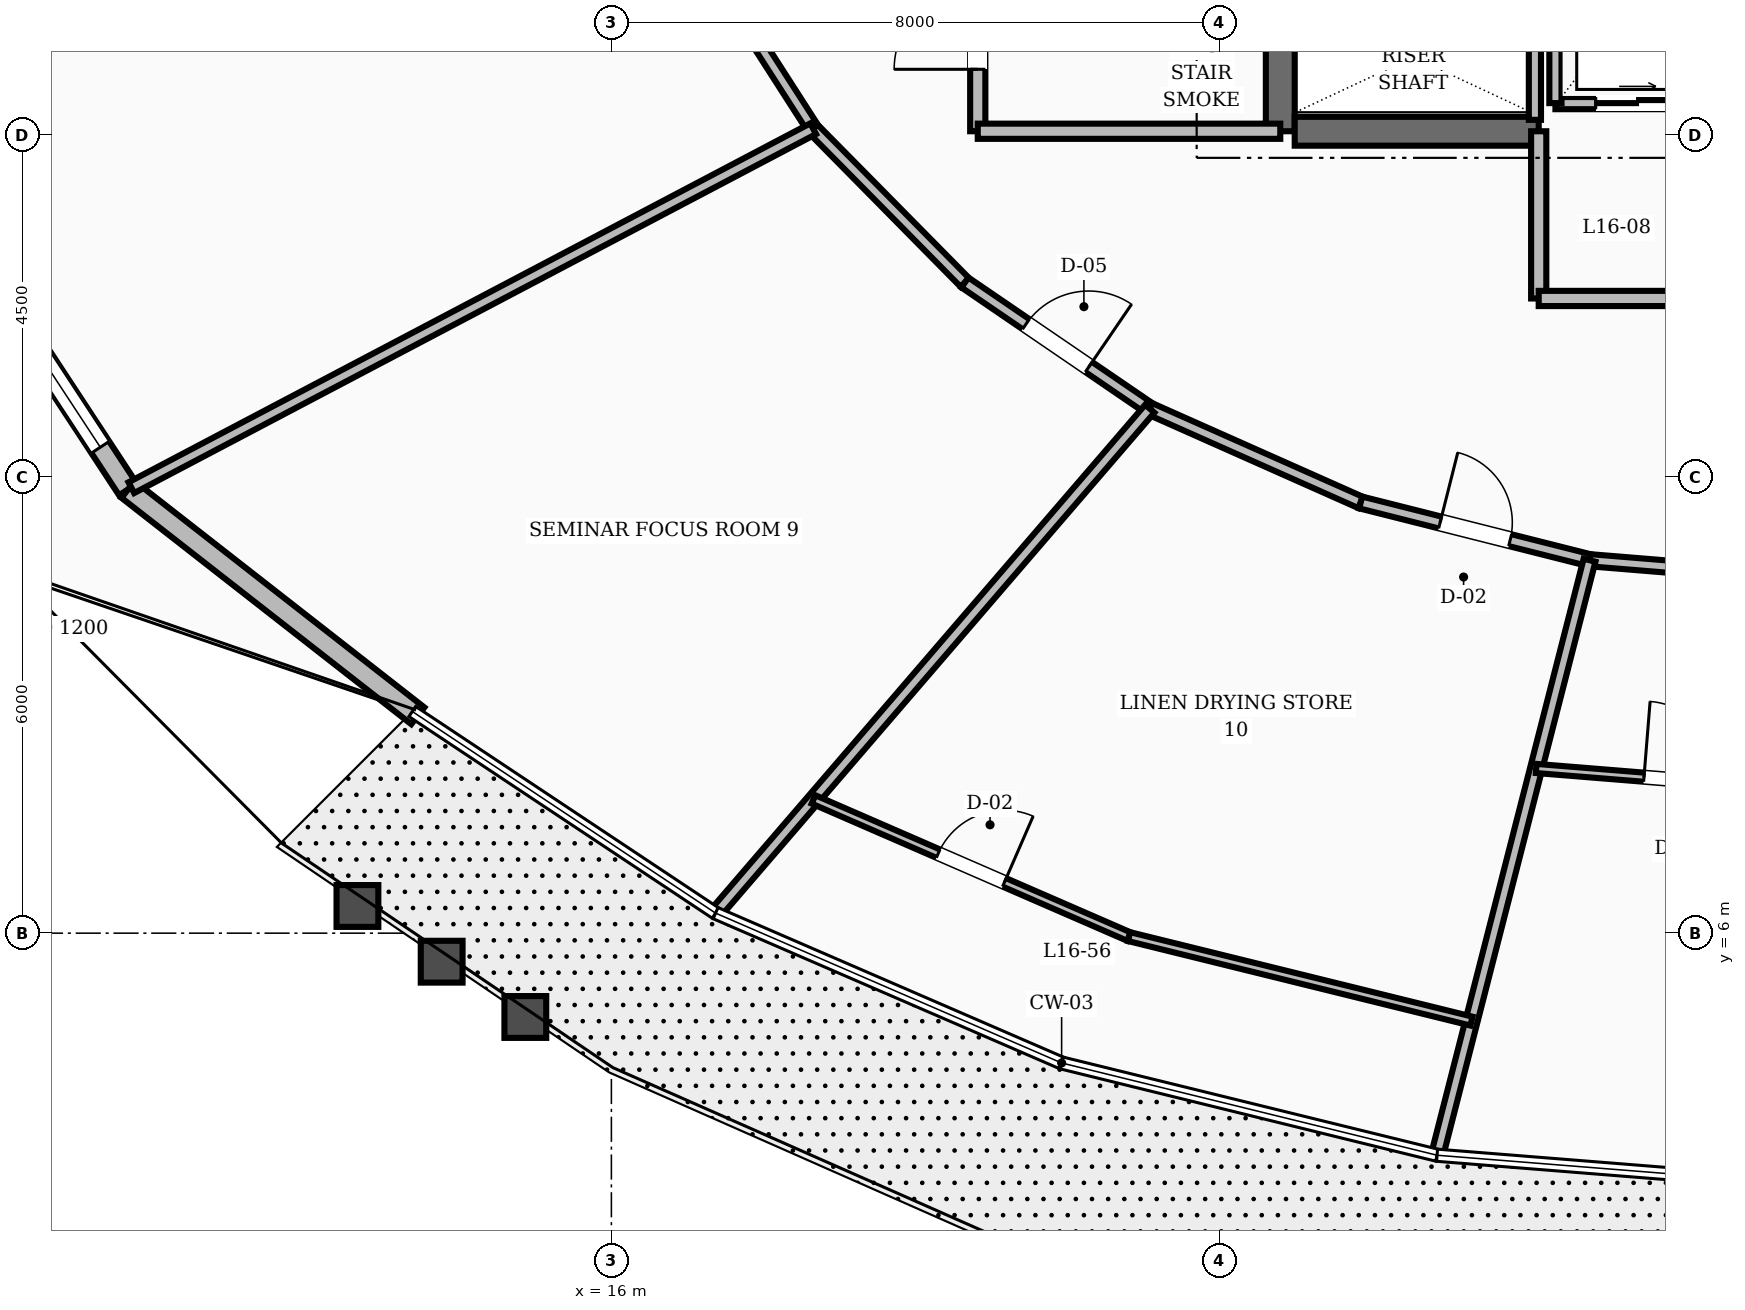
"""IFC4 building model, lengths in metres.
Left out: names, types, materials, properties, quantities, classifications, styles, units other than length and angle.
Written with IfcOpenShell. Run it as: python <this file> out.ifc"""

import sys

from ifc_helpers import new_model, si_unit, direction, frame, frame_2d, origin, place, context, subcontext, project, spatial, rectangle, extrude, element, fill, save


model = new_model("IFC4")
c1 = context("Model", 3, precision=1e-05, world=origin(), true_north=direction((0.0, 1.0)))
c2 = subcontext(c1, "Body", "Model", "MODEL_VIEW")
j1 = project(units=[si_unit("LENGTHUNIT", "METRE"), si_unit("PLANEANGLEUNIT", "RADIAN")], contexts=[c1])
p1 = place(None, origin())
s1 = spatial("IfcSite", under=j1, at=p1, CompositionType="ELEMENT")
p2 = place(p1, origin())
s2 = spatial("IfcBuilding", under=s1, at=p2, CompositionType="ELEMENT")
p3 = place(p2, frame((0.0, 0.0, 66.4)))
s3 = spatial("IfcBuildingStorey", under=s2, at=p3, CompositionType="ELEMENT", Elevation=66.4)
p4 = place(p3, frame((24.8, 16.55, 0.0), z_axis=(0.0, 0.0, 1.0), x_axis=(0.0, 1.0, 0.0)))
e1 = element("IfcWall", 1, at=p4, inside=s3, PredefinedType="SHEAR", context=c2, shape_type="SweptSolid", body=[
    extrude(rectangle(XDim=6.3, YDim=0.38, at=frame_2d((3.15, 0.0))), origin(), (0.0, 0.0, 1.0), 3.6),
])
p5 = place(p3, frame((24.99, 16.55, 0.0), z_axis=(0.0, 0.0, 1.0), x_axis=(1.0, 0.0, 0.0)))
e2 = element("IfcWall", 2, at=p5, inside=s3, PredefinedType="SHEAR", context=c2, shape_type="SweptSolid", body=[
    extrude(rectangle(XDim=3.21, YDim=0.38, at=frame_2d((1.605, 0.0))), origin(), (0.0, 0.0, 1.0), 3.6),
])
p6 = place(p3, frame((7.156, 15.623, 0.0), z_axis=(0.0, 0.0, 1.0), x_axis=(0.54881308027, -0.83594509564, 0.0)))
e3 = element("IfcWall", 3, at=p6, inside=s3, PredefinedType="STANDARD", context=c2, shape_type="SweptSolid", body=[
    extrude(rectangle(XDim=4.528, YDim=0.28, at=frame_2d((2.264, 0.0))), origin(), (0.0, 0.0, 1.0), 2.71),
])
p7 = place(p6, frame((0.664, 0.0, 0.8)))
e4 = element("IfcOpeningElement", 4, at=p7, cuts=e3, PredefinedType="OPENING", context=c2, shape_type="SweptSolid", body=[
    extrude(rectangle(XDim=3.2, YDim=1.65, at=frame_2d((1.6, 0.825))), frame((0.0, 0.15, 0.0), z_axis=(0.0, -1.0, 0.0), x_axis=(1.0, 0.0, 0.0)), (0.0, 0.0, 1.0), 0.3),
])
p8 = place(p3, frame((9.64, 11.838, 0.0), z_axis=(0.0, 0.0, 1.0), x_axis=(0.788136059421, -0.615501057546, 0.0)))
e5 = element("IfcWall", 5, at=p8, inside=s3, PredefinedType="STANDARD", context=c2, shape_type="SweptSolid", body=[
    extrude(rectangle(XDim=4.838, YDim=0.28, at=frame_2d((2.419, 0.0))), origin(), (0.0, 0.0, 1.0), 2.71),
])
p9 = place(p3, frame((20.82, 16.55, 0.0), z_axis=(0.0, 0.0, 1.0), x_axis=(0.0, 1.0, 0.0)))
e6 = element("IfcWall", 6, at=p9, inside=s3, PredefinedType="SOLIDWALL", context=c2, shape_type="SweptSolid", body=[
    extrude(rectangle(XDim=2.73, YDim=0.2, at=frame_2d((1.365, 0.0))), origin(), (0.0, 0.0, 1.0), 2.71),
])
p10 = place(p9, frame((0.815, 0.0, 0.0)))
e7 = element("IfcOpeningElement", 7, at=p10, cuts=e6, PredefinedType="OPENING", context=c2, shape_type="SweptSolid", body=[
    extrude(rectangle(XDim=1.1, YDim=2.1, at=frame_2d((0.55, 1.05))), frame((0.0, 0.11, 0.0), z_axis=(0.0, -1.0, 0.0), x_axis=(1.0, 0.0, 0.0)), (0.0, 0.0, 1.0), 0.22),
])
p11 = place(p3, frame((20.82, 16.55, 0.0), z_axis=(0.0, 0.0, 1.0), x_axis=(1.0, 0.0, 0.0)))
e8 = element("IfcWall", 8, at=p11, inside=s3, PredefinedType="SOLIDWALL", context=c2, shape_type="SweptSolid", body=[
    extrude(rectangle(XDim=3.98, YDim=0.2, at=frame_2d((1.99, 0.0))), origin(), (0.0, 0.0, 1.0), 2.71),
])
p12 = place(p3, frame((28.2, 14.35, 0.0), z_axis=(0.0, 0.0, 1.0), x_axis=(0.0, 1.0, 0.0)))
e9 = element("IfcWall", 9, at=p12, inside=s3, PredefinedType="SOLIDWALL", context=c2, shape_type="SweptSolid", body=[
    extrude(rectangle(XDim=2.2, YDim=0.2, at=frame_2d((1.1, 0.0))), origin(), (0.0, 0.0, 1.0), 2.71),
])
p13 = place(p3, frame((28.2, 14.35, 0.0), z_axis=(0.0, 0.0, 1.0), x_axis=(1.0, 0.0, 0.0)))
e10 = element("IfcWall", 10, at=p13, inside=s3, PredefinedType="SOLIDWALL", context=c2, shape_type="SweptSolid", body=[
    extrude(rectangle(XDim=7.6, YDim=0.2, at=frame_2d((3.8, 0.0))), origin(), (0.0, 0.0, 1.0), 2.71),
])
p14 = place(p13, frame((3.2, 0.0, 0.0)))
e11 = element("IfcOpeningElement", 11, at=p14, cuts=e10, PredefinedType="OPENING", context=c2, shape_type="SweptSolid", body=[
    extrude(rectangle(XDim=1.2, YDim=2.1, at=frame_2d((0.6, 1.05))), frame((0.0, 0.11, 0.0), z_axis=(0.0, -1.0, 0.0), x_axis=(1.0, 0.0, 0.0)), (0.0, 0.0, 1.0), 0.22),
])
p15 = place(p3, frame((28.42, 16.92, 0.0), z_axis=(0.0, 0.0, 1.0), x_axis=(1.0, 0.0, 0.0)))
e12 = element("IfcWall", 12, at=p15, inside=s3, PredefinedType="SOLIDWALL", context=c2, shape_type="SweptSolid", body=[
    extrude(rectangle(XDim=7.16, YDim=0.16, at=frame_2d((3.58, 0.0))), origin(), (0.0, 0.0, 1.0), 2.71),
])
p16 = place(p15, frame((0.53, 0.0, 0.0)))
e13 = element("IfcOpeningElement", 13, at=p16, cuts=e12, PredefinedType="OPENING", context=c2, shape_type="SweptSolid", body=[
    extrude(rectangle(XDim=1.1, YDim=2.15, at=frame_2d((0.55, 1.075))), frame((0.0, 0.09, 0.0), z_axis=(0.0, -1.0, 0.0), x_axis=(1.0, 0.0, 0.0)), (0.0, 0.0, 1.0), 0.18),
])
p17 = place(p15, frame((3.03, 0.0, 0.0)))
e14 = element("IfcOpeningElement", 14, at=p17, cuts=e12, PredefinedType="OPENING", context=c2, shape_type="SweptSolid", body=[
    extrude(rectangle(XDim=1.1, YDim=2.15, at=frame_2d((0.55, 1.075))), frame((0.0, 0.09, 0.0), z_axis=(0.0, -1.0, 0.0), x_axis=(1.0, 0.0, 0.0)), (0.0, 0.0, 1.0), 0.18),
])
p18 = place(p15, frame((5.53, 0.0, 0.0)))
e15 = element("IfcOpeningElement", 15, at=p18, cuts=e12, PredefinedType="OPENING", context=c2, shape_type="SweptSolid", body=[
    extrude(rectangle(XDim=1.1, YDim=2.15, at=frame_2d((0.55, 1.075))), frame((0.0, 0.09, 0.0), z_axis=(0.0, -1.0, 0.0), x_axis=(1.0, 0.0, 0.0)), (0.0, 0.0, 1.0), 0.18),
])
p19 = place(p3, frame((28.42, 16.92, 0.0), z_axis=(0.0, 0.0, 1.0), x_axis=(0.0, 1.0, 0.0)))
e16 = element("IfcWall", 16, at=p19, inside=s3, PredefinedType="SOLIDWALL", context=c2, shape_type="SweptSolid", body=[
    extrude(rectangle(XDim=2.76, YDim=0.16, at=frame_2d((1.38, 0.0))), origin(), (0.0, 0.0, 1.0), 2.71),
])
p20 = place(p3, frame((28.15, 16.7, 0.0), z_axis=(0.0, 0.0, 1.0), x_axis=(0.0, 1.0, 0.0)))
e17 = element("IfcWall", 17, at=p20, inside=s3, PredefinedType="SOLIDWALL", context=c2, shape_type="SweptSolid", body=[
    extrude(rectangle(XDim=6.05, YDim=0.16, at=frame_2d((3.025, 0.0))), origin(), (0.0, 0.0, 1.0), 2.71),
])
p21 = place(p3, frame((17.172, 18.891, 0.0), z_axis=(0.0, 0.0, 1.0), x_axis=(0.540595670038, -0.841282545603, 0.0)))
e18 = element("IfcWall", 18, at=p21, inside=s3, PredefinedType="SOLIDWALL", context=c2, shape_type="SweptSolid", body=[
    extrude(rectangle(XDim=2.744, YDim=0.16, at=frame_2d((1.372, 0.0))), origin(), (0.0, 0.0, 1.0), 2.71),
])
p22 = place(p3, frame((18.655, 16.583, 0.0), z_axis=(0.0, 0.0, 1.0), x_axis=(0.702366174226, -0.711815816981, 0.0)))
e19 = element("IfcWall", 19, at=p22, inside=s3, PredefinedType="SOLIDWALL", context=c2, shape_type="SweptSolid", body=[
    extrude(rectangle(XDim=2.842, YDim=0.16, at=frame_2d((1.421, 0.0))), origin(), (0.0, 0.0, 1.0), 2.71),
])
p23 = place(p3, frame((20.651, 14.56, 0.0), z_axis=(0.0, 0.0, 1.0), x_axis=(0.825929039072, -0.563774088104, 0.0)))
e20 = element("IfcWall", 20, at=p23, inside=s3, PredefinedType="SOLIDWALL", context=c2, shape_type="SweptSolid", body=[
    extrude(rectangle(XDim=2.945, YDim=0.16, at=frame_2d((1.472, 0.0))), origin(), (0.0, 0.0, 1.0), 2.71),
])
p24 = place(p23, frame((0.972, 0.0, 0.0)))
e21 = element("IfcOpeningElement", 21, at=p24, cuts=e20, PredefinedType="OPENING", context=c2, shape_type="SweptSolid", body=[
    extrude(rectangle(XDim=1.0, YDim=2.1, at=frame_2d((0.5, 1.05))), frame((0.0, 0.09, 0.0), z_axis=(0.0, -1.0, 0.0), x_axis=(1.0, 0.0, 0.0)), (0.0, 0.0, 1.0), 0.18),
])
p25 = place(p3, frame((23.083, 12.9, 0.0), z_axis=(0.0, 0.0, 1.0), x_axis=(0.913768445178, -0.406235434936, 0.0)))
e22 = element("IfcWall", 22, at=p25, inside=s3, PredefinedType="SOLIDWALL", context=c2, shape_type="SweptSolid", body=[
    extrude(rectangle(XDim=3.037, YDim=0.16, at=frame_2d((1.519, 0.0))), origin(), (0.0, 0.0, 1.0), 2.71),
])
p26 = place(p3, frame((25.858, 11.666, 0.0), z_axis=(0.0, 0.0, 1.0), x_axis=(0.969608333194, -0.244662380029, 0.0)))
e23 = element("IfcWall", 23, at=p26, inside=s3, PredefinedType="SOLIDWALL", context=c2, shape_type="SweptSolid", body=[
    extrude(rectangle(XDim=3.105, YDim=0.16, at=frame_2d((1.553, 0.0))), origin(), (0.0, 0.0, 1.0), 2.71),
])
p27 = place(p26, frame((1.078, 0.0, 0.0)))
e24 = element("IfcOpeningElement", 24, at=p27, cuts=e23, PredefinedType="OPENING", context=c2, shape_type="SweptSolid", body=[
    extrude(rectangle(XDim=0.95, YDim=2.1, at=frame_2d((0.475, 1.05))), frame((0.0, 0.09, 0.0), z_axis=(0.0, -1.0, 0.0), x_axis=(1.0, 0.0, 0.0)), (0.0, 0.0, 1.0), 0.18),
])
p28 = place(p3, frame((28.869, 10.906, 0.0), z_axis=(0.0, 0.0, 1.0), x_axis=(0.996658973252, -0.081675522876, 0.0)))
e25 = element("IfcWall", 25, at=p28, inside=s3, PredefinedType="SOLIDWALL", context=c2, shape_type="SweptSolid", body=[
    extrude(rectangle(XDim=3.142, YDim=0.16, at=frame_2d((1.571, 0.0))), origin(), (0.0, 0.0, 1.0), 2.71),
])
p29 = place(p3, frame((28.869, 10.906, 0.0), z_axis=(0.0, 0.0, 1.0), x_axis=(-0.248210785058, -0.968706047354, 0.0)))
e26 = element("IfcWall", 26, at=p29, inside=s3, PredefinedType="SOLIDWALL", context=c2, shape_type="SweptSolid", body=[
    extrude(rectangle(XDim=8.031, YDim=0.16, at=frame_2d((4.016, 0.0))), origin(), (0.0, 0.0, 1.0), 2.71),
])
p30 = place(p3, frame((28.167, 8.167, 0.0), z_axis=(0.0, 0.0, 1.0), x_axis=(0.99673954334, -0.080686323138, 0.0)))
e27 = element("IfcWall", 27, at=p30, inside=s3, PredefinedType="PARTITIONING", context=c2, shape_type="SweptSolid", body=[
    extrude(rectangle(XDim=3.846, YDim=0.12, at=frame_2d((1.923, 0.0))), origin(), (0.0, 0.0, 1.0), 2.71),
])
p31 = place(p30, frame((1.423, 0.0, 0.0)))
e28 = element("IfcOpeningElement", 28, at=p31, cuts=e27, PredefinedType="OPENING", context=c2, shape_type="SweptSolid", body=[
    extrude(rectangle(XDim=1.0, YDim=2.1, at=frame_2d((0.5, 1.05))), frame((0.0, 0.07, 0.0), z_axis=(0.0, -1.0, 0.0), x_axis=(1.0, 0.0, 0.0)), (0.0, 0.0, 1.0), 0.14),
])
p32 = place(p3, frame((18.655, 16.583, 0.0), z_axis=(0.0, 0.0, 1.0), x_axis=(-0.88488217161, -0.465814922868, 0.0)))
e29 = element("IfcWall", 29, at=p32, inside=s3, PredefinedType="SOLIDWALL", context=c2, shape_type="SweptSolid", body=[
    extrude(rectangle(XDim=10.137, YDim=0.16, at=frame_2d((5.068, 0.0))), origin(), (0.0, 0.0, 1.0), 2.71),
])
p33 = place(p3, frame((23.083, 12.9, 0.0), z_axis=(0.0, 0.0, 1.0), x_axis=(-0.652358069084, -0.757910911454, 0.0)))
e30 = element("IfcWall", 30, at=p33, inside=s3, PredefinedType="SOLIDWALL", context=c2, shape_type="SweptSolid", body=[
    extrude(rectangle(XDim=8.706, YDim=0.16, at=frame_2d((4.353, 0.0))), origin(), (0.0, 0.0, 1.0), 2.71),
])
p34 = place(p3, frame((18.659, 7.76, 0.0), z_axis=(0.0, 0.0, 1.0), x_axis=(0.917079487315, -0.398704419272, 0.0)))
e31 = element("IfcWall", 31, at=p34, inside=s3, PredefinedType="PARTITIONING", context=c2, shape_type="SweptSolid", body=[
    extrude(rectangle(XDim=4.527, YDim=0.12, at=frame_2d((2.264, 0.0))), origin(), (0.0, 0.0, 1.0), 2.71),
])
p35 = place(p34, frame((1.789, 0.0, 0.0)))
e32 = element("IfcOpeningElement", 32, at=p35, cuts=e31, PredefinedType="OPENING", context=c2, shape_type="SweptSolid", body=[
    extrude(rectangle(XDim=0.95, YDim=2.1, at=frame_2d((0.475, 1.05))), frame((0.0, 0.07, 0.0), z_axis=(0.0, -1.0, 0.0), x_axis=(1.0, 0.0, 0.0)), (0.0, 0.0, 1.0), 0.14),
])
p36 = place(p3, frame((22.81, 5.955, 0.0), z_axis=(0.0, 0.0, 1.0), x_axis=(0.970880772031, -0.239563199385, 0.0)))
e33 = element("IfcWall", 33, at=p36, inside=s3, PredefinedType="PARTITIONING", context=c2, shape_type="SweptSolid", body=[
    extrude(rectangle(XDim=4.64, YDim=0.12, at=frame_2d((2.32, 0.0))), origin(), (0.0, 0.0, 1.0), 2.71),
])
p37 = place(p7, origin())
e34 = element("IfcWindow", 34, at=p37, inside=s3, PartitioningType="SINGLE_PANEL", PredefinedType="WINDOW", context=c2, shape_type="SweptSolid", body=[
    extrude(rectangle(XDim=3.2, YDim=1.65, at=frame_2d((1.6, 0.825))), frame((0.0, 0.03, 0.0), z_axis=(0.0, -1.0, 0.0), x_axis=(1.0, 0.0, 0.0)), (0.0, 0.0, 1.0), 0.06),
])
fill(e4, e34)
p38 = place(p10, origin())
e35 = element("IfcDoor", 35, at=p38, inside=s3, OperationType="SINGLE_SWING_LEFT", PredefinedType="DOOR", context=c2, shape_type="SweptSolid", body=[
    extrude(rectangle(XDim=1.1, YDim=2.1, at=frame_2d((0.55, 1.05))), frame((0.0, 0.025, 0.0), z_axis=(0.0, -1.0, 0.0), x_axis=(1.0, 0.0, 0.0)), (0.0, 0.0, 1.0), 0.05),
])
fill(e7, e35)
p39 = place(p16, origin())
e36 = element("IfcDoor", 36, at=p39, inside=s3, OperationType="SLIDING_TO_RIGHT", PredefinedType="DOOR", context=c2, shape_type="SweptSolid", body=[
    extrude(rectangle(XDim=1.1, YDim=2.15, at=frame_2d((0.55, 1.075))), frame((0.0, 0.025, 0.0), z_axis=(0.0, -1.0, 0.0), x_axis=(1.0, 0.0, 0.0)), (0.0, 0.0, 1.0), 0.05),
])
fill(e13, e36)
p40 = place(p31, origin())
e37 = element("IfcDoor", 37, at=p40, inside=s3, OperationType="SINGLE_SWING_LEFT", PredefinedType="DOOR", context=c2, shape_type="SweptSolid", body=[
    extrude(rectangle(XDim=1.0, YDim=2.1, at=frame_2d((0.5, 1.05))), frame((0.0, 0.025, 0.0), z_axis=(0.0, -1.0, 0.0), x_axis=(1.0, 0.0, 0.0)), (0.0, 0.0, 1.0), 0.05),
])
fill(e28, e37)
p41 = place(p24, origin())
e38 = element("IfcDoor", 38, at=p41, inside=s3, OperationType="SINGLE_SWING_RIGHT", PredefinedType="DOOR", context=c2, shape_type="SweptSolid", body=[
    extrude(rectangle(XDim=1.0, YDim=2.1, at=frame_2d((0.5, 1.05))), frame((0.0, 0.025, 0.0), z_axis=(0.0, -1.0, 0.0), x_axis=(1.0, 0.0, 0.0)), (0.0, 0.0, 1.0), 0.05),
])
fill(e21, e38)
p42 = place(p27, origin())
e39 = element("IfcDoor", 39, at=p42, inside=s3, OperationType="SINGLE_SWING_LEFT", PredefinedType="DOOR", context=c2, shape_type="SweptSolid", body=[
    extrude(rectangle(XDim=0.95, YDim=2.1, at=frame_2d((0.475, 1.05))), frame((0.0, 0.025, 0.0), z_axis=(0.0, -1.0, 0.0), x_axis=(1.0, 0.0, 0.0)), (0.0, 0.0, 1.0), 0.05),
])
fill(e24, e39)
p43 = place(p35, origin())
e40 = element("IfcDoor", 40, at=p43, inside=s3, OperationType="SINGLE_SWING_RIGHT", PredefinedType="DOOR", context=c2, shape_type="SweptSolid", body=[
    extrude(rectangle(XDim=0.95, YDim=2.1, at=frame_2d((0.475, 1.05))), frame((0.0, 0.025, 0.0), z_axis=(0.0, -1.0, 0.0), x_axis=(1.0, 0.0, 0.0)), (0.0, 0.0, 1.0), 0.05),
])
fill(e32, e40)
save(model, sys.argv[1])
